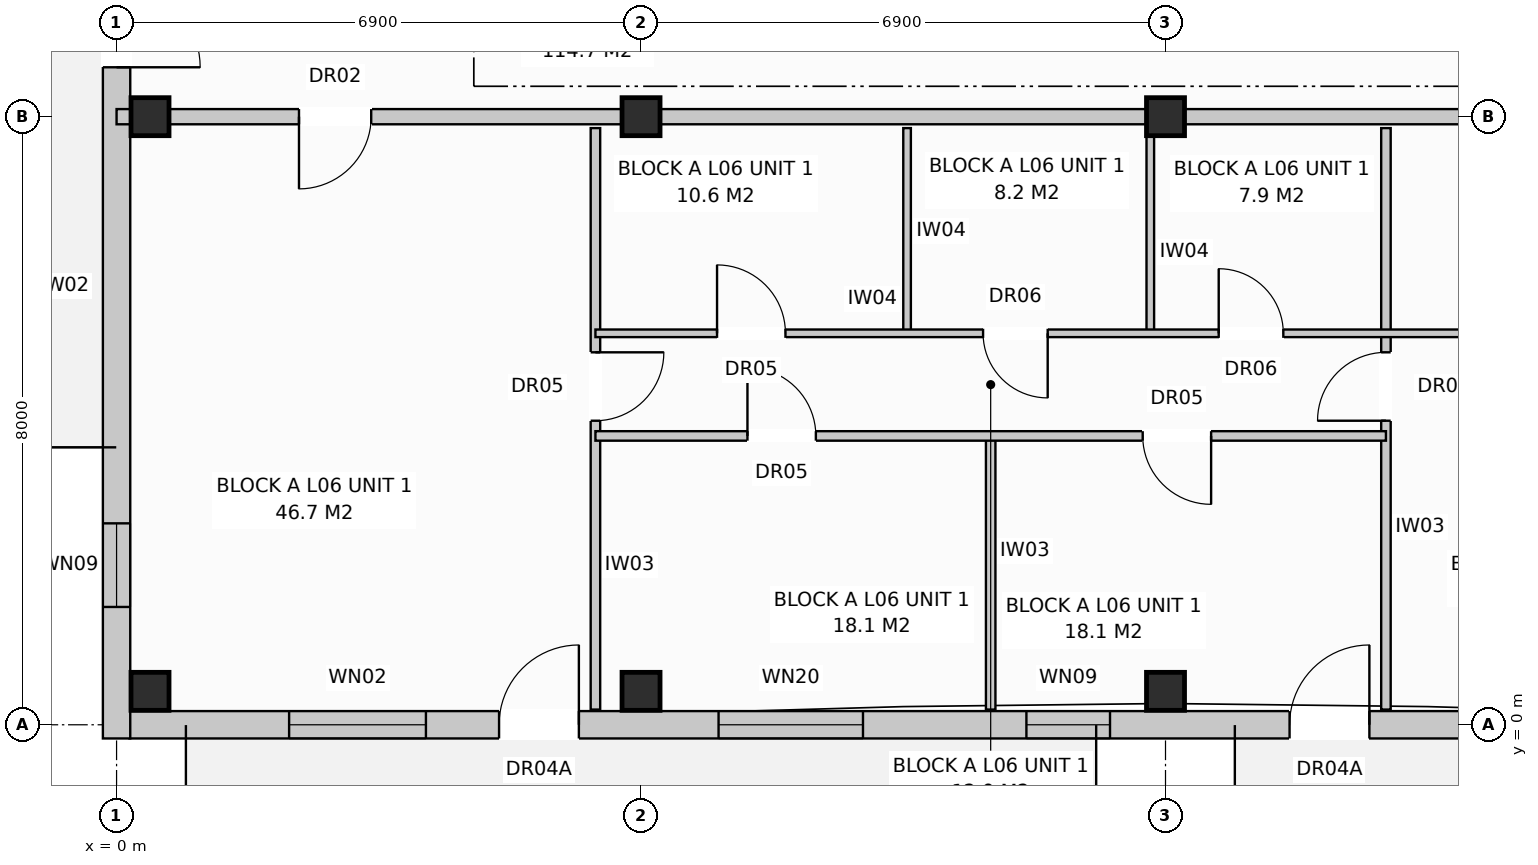
"""IFC4 building model, lengths in metres.
Left out: names, types, materials, properties, quantities, classifications, styles, units other than length and angle.
Written with IfcOpenShell. Run it as: python <this file> out.ifc"""

import sys

from ifc_helpers import new_model, si_unit, direction, frame, frame_2d, origin, origin_with_axes, origin_2d, place, context, subcontext, project, spatial, rectangle, extrude, element, fill, save


model = new_model("IFC4")
c1 = context("Model", 3, precision=1e-05, world=origin(), true_north=direction((0.0, 1.0)))
c2 = subcontext(c1, "Body", "Model", "MODEL_VIEW")
j1 = project(units=[si_unit("LENGTHUNIT", "METRE"), si_unit("PLANEANGLEUNIT", "RADIAN")], contexts=[c1])
p1 = place(None, origin())
s1 = spatial("IfcSite", under=j1, at=p1, CompositionType="ELEMENT")
p2 = place(p1, origin())
s2 = spatial("IfcBuilding", under=s1, at=p2, CompositionType="ELEMENT")
p3 = place(p2, frame((0.0, 0.0, 20.8)))
s3 = spatial("IfcBuildingStorey", under=s2, at=p3, CompositionType="ELEMENT", Elevation=20.8)
for number, where, z_axis, x_axis in (
    (1, (0.44, 0.44, 0.0), (0.0, 0.0, 1.0), (1.0, 0.0, 0.0)),
    (2, (0.44, 8.0, 0.0), (0.0, 0.0, 1.0), (1.0, 0.0, 0.0)),
    (3, (6.9, 0.44, 0.0), (0.0, 0.0, 1.0), (1.0, 0.0, 0.0)),
    (4, (6.9, 8.0, 0.0), (0.0, 0.0, 1.0), (1.0, 0.0, 0.0)),
    (5, (13.8, 0.44, 0.0), (0.0, 0.0, 1.0), (1.0, 0.0, 0.0)),
    (6, (13.8, 8.0, 0.0), (0.0, 0.0, 1.0), (1.0, 0.0, 0.0)),
):
    element("IfcColumn", number, at=place(p3, frame(where, z_axis=z_axis, x_axis=x_axis)), inside=s3, PredefinedType="COLUMN", context=c2, shape_type="SweptSolid", body=[
        extrude(rectangle(XDim=0.5, YDim=0.5, at=origin_2d()), origin(), (0.0, 0.0, 1.0), 3.2),
    ])
p4 = place(p3, frame((0.17, 0.0, 0.0), z_axis=(0.0, 0.0, 1.0), x_axis=(1.0, 0.0, 0.0)))
e7 = element("IfcWall", 7, at=p4, inside=s3, PredefinedType="STANDARD", context=c2, shape_type="SweptSolid", body=[
    extrude(rectangle(XDim=54.86, YDim=0.36, at=frame_2d((27.43, 0.0))), origin(), (0.0, 0.0, 1.0), 2.95),
])
p5 = place(p4, frame((4.862, 0.0, 0.0)))
e8 = element("IfcOpeningElement", 8, at=p5, cuts=e7, PredefinedType="OPENING", context=c2, shape_type="SweptSolid", body=[
    extrude(rectangle(XDim=1.05, YDim=2.12, at=frame_2d((0.525, 1.06))), frame((0.0, 0.192, 0.0), z_axis=(0.0, -1.0, 0.0), x_axis=(1.0, 0.0, 0.0)), (0.0, 0.0, 1.0), 0.384),
])
p6 = place(p4, frame((15.262, 0.0, 0.0)))
e9 = element("IfcOpeningElement", 9, at=p6, cuts=e7, PredefinedType="OPENING", context=c2, shape_type="SweptSolid", body=[
    extrude(rectangle(XDim=1.05, YDim=2.12, at=frame_2d((0.525, 1.06))), frame((0.0, 0.192, 0.0), z_axis=(0.0, -1.0, 0.0), x_axis=(1.0, 0.0, 0.0)), (0.0, 0.0, 1.0), 0.384),
])
p7 = place(p4, frame((31.362, 0.0, 0.0)))
e10 = element("IfcOpeningElement", 10, at=p7, cuts=e7, PredefinedType="OPENING", context=c2, shape_type="SweptSolid", body=[
    extrude(rectangle(XDim=1.05, YDim=2.12, at=frame_2d((0.525, 1.06))), frame((0.0, 0.192, 0.0), z_axis=(0.0, -1.0, 0.0), x_axis=(1.0, 0.0, 0.0)), (0.0, 0.0, 1.0), 0.384),
])
p8 = place(p4, frame((44.235, 0.0, 0.0)))
e11 = element("IfcOpeningElement", 11, at=p8, cuts=e7, PredefinedType="OPENING", context=c2, shape_type="SweptSolid", body=[
    extrude(rectangle(XDim=1.05, YDim=2.12, at=frame_2d((0.525, 1.06))), frame((0.0, 0.192, 0.0), z_axis=(0.0, -1.0, 0.0), x_axis=(1.0, 0.0, 0.0)), (0.0, 0.0, 1.0), 0.384),
])
p9 = place(p4, frame((2.1, 0.0, 0.8)))
e12 = element("IfcOpeningElement", 12, at=p9, cuts=e7, PredefinedType="OPENING", context=c2, shape_type="SweptSolid", body=[
    extrude(rectangle(XDim=1.8, YDim=1.7, at=frame_2d((0.9, 0.85))), frame((0.0, 0.192, 0.0), z_axis=(0.0, -1.0, 0.0), x_axis=(1.0, 0.0, 0.0)), (0.0, 0.0, 1.0), 0.384),
])
p10 = place(p4, frame((7.75, 0.0, 0.72)))
e13 = element("IfcOpeningElement", 13, at=p10, cuts=e7, PredefinedType="OPENING", context=c2, shape_type="SweptSolid", body=[
    extrude(rectangle(XDim=1.9, YDim=1.85, at=frame_2d((0.95, 0.925))), frame((0.0, 0.192, 0.0), z_axis=(0.0, -1.0, 0.0), x_axis=(1.0, 0.0, 0.0)), (0.0, 0.0, 1.0), 0.384),
])
p11 = place(p4, frame((11.8, 0.0, 0.72)))
e14 = element("IfcOpeningElement", 14, at=p11, cuts=e7, PredefinedType="OPENING", context=c2, shape_type="SweptSolid", body=[
    extrude(rectangle(XDim=1.1, YDim=1.5, at=frame_2d((0.55, 0.75))), frame((0.0, 0.192, 0.0), z_axis=(0.0, -1.0, 0.0), x_axis=(1.0, 0.0, 0.0)), (0.0, 0.0, 1.0), 0.384),
])
p12 = place(p4, frame((17.6, 0.0, 0.8)))
e15 = element("IfcOpeningElement", 15, at=p12, cuts=e7, PredefinedType="OPENING", context=c2, shape_type="SweptSolid", body=[
    extrude(rectangle(XDim=1.8, YDim=1.7, at=frame_2d((0.9, 0.85))), frame((0.0, 0.192, 0.0), z_axis=(0.0, -1.0, 0.0), x_axis=(1.0, 0.0, 0.0)), (0.0, 0.0, 1.0), 0.384),
])
p13 = place(p4, frame((21.55, 0.0, 0.72)))
e16 = element("IfcOpeningElement", 16, at=p13, cuts=e7, PredefinedType="OPENING", context=c2, shape_type="SweptSolid", body=[
    extrude(rectangle(XDim=1.9, YDim=1.85, at=frame_2d((0.95, 0.925))), frame((0.0, 0.192, 0.0), z_axis=(0.0, -1.0, 0.0), x_axis=(1.0, 0.0, 0.0)), (0.0, 0.0, 1.0), 0.384),
])
p14 = place(p4, frame((25.35, 0.0, 0.72)))
e17 = element("IfcOpeningElement", 17, at=p14, cuts=e7, PredefinedType="OPENING", context=c2, shape_type="SweptSolid", body=[
    extrude(rectangle(XDim=1.1, YDim=1.5, at=frame_2d((0.55, 0.75))), frame((0.0, 0.192, 0.0), z_axis=(0.0, -1.0, 0.0), x_axis=(1.0, 0.0, 0.0)), (0.0, 0.0, 1.0), 0.384),
])
p15 = place(p4, frame((29.2, 0.0, 0.8)))
e18 = element("IfcOpeningElement", 18, at=p15, cuts=e7, PredefinedType="OPENING", context=c2, shape_type="SweptSolid", body=[
    extrude(rectangle(XDim=1.8, YDim=1.7, at=frame_2d((0.9, 0.85))), frame((0.0, 0.192, 0.0), z_axis=(0.0, -1.0, 0.0), x_axis=(1.0, 0.0, 0.0)), (0.0, 0.0, 1.0), 0.384),
])
p16 = place(p4, frame((34.833, 0.0, 0.72)))
e19 = element("IfcOpeningElement", 19, at=p16, cuts=e7, PredefinedType="OPENING", context=c2, shape_type="SweptSolid", body=[
    extrude(rectangle(XDim=1.9, YDim=1.85, at=frame_2d((0.95, 0.925))), frame((0.0, 0.192, 0.0), z_axis=(0.0, -1.0, 0.0), x_axis=(1.0, 0.0, 0.0)), (0.0, 0.0, 1.0), 0.384),
])
p17 = place(p4, frame((38.025, 0.0, 0.8)))
e20 = element("IfcOpeningElement", 20, at=p17, cuts=e7, PredefinedType="OPENING", context=c2, shape_type="SweptSolid", body=[
    extrude(rectangle(XDim=1.95, YDim=1.65, at=frame_2d((0.975, 0.825))), frame((0.0, 0.192, 0.0), z_axis=(0.0, -1.0, 0.0), x_axis=(1.0, 0.0, 0.0)), (0.0, 0.0, 1.0), 0.384),
])
p18 = place(p4, frame((42.1, 0.0, 0.8)))
e21 = element("IfcOpeningElement", 21, at=p18, cuts=e7, PredefinedType="OPENING", context=c2, shape_type="SweptSolid", body=[
    extrude(rectangle(XDim=1.8, YDim=1.7, at=frame_2d((0.9, 0.85))), frame((0.0, 0.192, 0.0), z_axis=(0.0, -1.0, 0.0), x_axis=(1.0, 0.0, 0.0)), (0.0, 0.0, 1.0), 0.384),
])
p19 = place(p4, frame((45.75, 0.0, 0.72)))
e22 = element("IfcOpeningElement", 22, at=p19, cuts=e7, PredefinedType="OPENING", context=c2, shape_type="SweptSolid", body=[
    extrude(rectangle(XDim=1.9, YDim=1.85, at=frame_2d((0.95, 0.925))), frame((0.0, 0.192, 0.0), z_axis=(0.0, -1.0, 0.0), x_axis=(1.0, 0.0, 0.0)), (0.0, 0.0, 1.0), 0.384),
])
p20 = place(p4, frame((49.125, 0.0, 0.8)))
e23 = element("IfcOpeningElement", 23, at=p20, cuts=e7, PredefinedType="OPENING", context=c2, shape_type="SweptSolid", body=[
    extrude(rectangle(XDim=1.95, YDim=1.65, at=frame_2d((0.975, 0.825))), frame((0.0, 0.192, 0.0), z_axis=(0.0, -1.0, 0.0), x_axis=(1.0, 0.0, 0.0)), (0.0, 0.0, 1.0), 0.384),
])
p21 = place(p4, frame((52.415, 0.0, 0.8)))
e24 = element("IfcOpeningElement", 24, at=p21, cuts=e7, PredefinedType="OPENING", context=c2, shape_type="SweptSolid", body=[
    extrude(rectangle(XDim=1.8, YDim=1.7, at=frame_2d((0.9, 0.85))), frame((0.0, 0.192, 0.0), z_axis=(0.0, -1.0, 0.0), x_axis=(1.0, 0.0, 0.0)), (0.0, 0.0, 1.0), 0.384),
])
p22 = place(p3, frame((0.0, -0.18, 0.0), z_axis=(0.0, 0.0, 1.0), x_axis=(0.0, 1.0, 0.0)))
e25 = element("IfcWall", 25, at=p22, inside=s3, PredefinedType="STANDARD", context=c2, shape_type="SweptSolid", body=[
    extrude(rectangle(XDim=18.76, YDim=0.36, at=frame_2d((9.38, 0.0))), origin(), (0.0, 0.0, 1.0), 2.95),
])
p23 = place(p22, frame((8.83, 0.0, 0.0)))
e26 = element("IfcOpeningElement", 26, at=p23, cuts=e25, PredefinedType="OPENING", context=c2, shape_type="SweptSolid", body=[
    extrude(rectangle(XDim=1.1, YDim=2.1, at=frame_2d((0.55, 1.05))), frame((0.0, 0.192, 0.0), z_axis=(0.0, -1.0, 0.0), x_axis=(1.0, 0.0, 0.0)), (0.0, 0.0, 1.0), 0.384),
])
p24 = place(p22, frame((1.73, 0.0, 0.72)))
e27 = element("IfcOpeningElement", 27, at=p24, cuts=e25, PredefinedType="OPENING", context=c2, shape_type="SweptSolid", body=[
    extrude(rectangle(XDim=1.1, YDim=1.5, at=frame_2d((0.55, 0.75))), frame((0.0, 0.192, 0.0), z_axis=(0.0, -1.0, 0.0), x_axis=(1.0, 0.0, 0.0)), (0.0, 0.0, 1.0), 0.384),
])
p25 = place(p22, frame((15.93, 0.0, 0.72)))
e28 = element("IfcOpeningElement", 28, at=p25, cuts=e25, PredefinedType="OPENING", context=c2, shape_type="SweptSolid", body=[
    extrude(rectangle(XDim=1.1, YDim=1.5, at=frame_2d((0.55, 0.75))), frame((0.0, 0.192, 0.0), z_axis=(0.0, -1.0, 0.0), x_axis=(1.0, 0.0, 0.0)), (0.0, 0.0, 1.0), 0.384),
])
p26 = place(p3, frame((0.0, 8.0, 0.0), z_axis=(0.0, 0.0, 1.0), x_axis=(1.0, 0.0, 0.0)))
e29 = element("IfcWall", 29, at=p26, inside=s3, PredefinedType="PARTITIONING", context=c2, shape_type="SweptSolid", body=[
    extrude(rectangle(XDim=20.7, YDim=0.2, at=frame_2d((10.35, 0.0))), origin(), (0.0, 0.0, 1.0), 2.39),
])
p27 = place(p26, frame((2.4, 0.0, 0.0)))
e30 = element("IfcOpeningElement", 30, at=p27, cuts=e29, PredefinedType="OPENING", context=c2, shape_type="SweptSolid", body=[
    extrude(rectangle(XDim=0.95, YDim=2.15, at=frame_2d((0.475, 1.075))), frame((0.0, 0.112, 0.0), z_axis=(0.0, -1.0, 0.0), x_axis=(1.0, 0.0, 0.0)), (0.0, 0.0, 1.0), 0.224),
])
p28 = place(p3, frame((6.3, 7.85, 0.0), z_axis=(0.0, 0.0, 1.0), x_axis=(0.0, -1.0, 0.0)))
e31 = element("IfcWall", 31, at=p28, inside=s3, PredefinedType="PARTITIONING", context=c2, shape_type="SweptSolid", body=[
    extrude(rectangle(XDim=7.65, YDim=0.125, at=frame_2d((3.825, 0.0))), origin(), (0.0, 0.0, 1.0), 2.95),
])
p29 = place(p28, frame((2.95, 0.0, 0.0)))
e32 = element("IfcOpeningElement", 32, at=p29, cuts=e31, PredefinedType="OPENING", context=c2, shape_type="SweptSolid", body=[
    extrude(rectangle(XDim=0.9, YDim=2.1, at=frame_2d((0.45, 1.05))), frame((0.0, 0.074, 0.0), z_axis=(0.0, -1.0, 0.0), x_axis=(1.0, 0.0, 0.0)), (0.0, 0.0, 1.0), 0.149),
])
for number, where, z_axis, x_axis in (
    (33, (10.4, 7.85, 0.0), (0.0, 0.0, 1.0), (0.0, -1.0, 0.0)),
    (34, (13.6, 7.85, 0.0), (0.0, 0.0, 1.0), (0.0, -1.0, 0.0)),
):
    element("IfcWall", number, at=place(p3, frame(where, z_axis=z_axis, x_axis=x_axis)), inside=s3, PredefinedType="PARTITIONING", context=c2, shape_type="SweptSolid", body=[
        extrude(rectangle(XDim=2.7, YDim=0.1, at=frame_2d((1.35, 0.0))), origin(), (0.0, 0.0, 1.0), 2.95),
    ])
p30 = place(p3, frame((11.5, 3.8, 0.0), z_axis=(0.0, 0.0, 1.0), x_axis=(0.0, -1.0, 0.0)))
e35 = element("IfcWall", 35, at=p30, inside=s3, PredefinedType="PARTITIONING", context=c2, shape_type="SweptSolid", body=[
    extrude(rectangle(XDim=3.6, YDim=0.125, at=frame_2d((1.8, 0.0))), origin(), (0.0, 0.0, 1.0), 2.95),
])
p31 = place(p3, frame((16.7, 7.85, 0.0), z_axis=(0.0, 0.0, 1.0), x_axis=(0.0, -1.0, 0.0)))
e36 = element("IfcWall", 36, at=p31, inside=s3, PredefinedType="PARTITIONING", context=c2, shape_type="SweptSolid", body=[
    extrude(rectangle(XDim=7.65, YDim=0.125, at=frame_2d((3.825, 0.0))), origin(), (0.0, 0.0, 1.0), 2.95),
])
p32 = place(p31, frame((2.95, 0.0, 0.0)))
e37 = element("IfcOpeningElement", 37, at=p32, cuts=e36, PredefinedType="OPENING", context=c2, shape_type="SweptSolid", body=[
    extrude(rectangle(XDim=0.9, YDim=2.1, at=frame_2d((0.45, 1.05))), frame((0.0, 0.074, 0.0), z_axis=(0.0, -1.0, 0.0), x_axis=(1.0, 0.0, 0.0)), (0.0, 0.0, 1.0), 0.149),
])
p33 = place(p3, frame((6.3, 5.15, 0.0), z_axis=(0.0, 0.0, 1.0), x_axis=(1.0, 0.0, 0.0)))
e38 = element("IfcWall", 38, at=p33, inside=s3, PredefinedType="PARTITIONING", context=c2, shape_type="SweptSolid", body=[
    extrude(rectangle(XDim=14.3, YDim=0.1, at=frame_2d((7.15, 0.0))), origin(), (0.0, 0.0, 1.0), 2.95),
])
p34 = place(p33, frame((1.6, 0.0, 0.0)))
e39 = element("IfcOpeningElement", 39, at=p34, cuts=e38, PredefinedType="OPENING", context=c2, shape_type="SweptSolid", body=[
    extrude(rectangle(XDim=0.9, YDim=2.1, at=frame_2d((0.45, 1.05))), frame((0.0, 0.062, 0.0), z_axis=(0.0, -1.0, 0.0), x_axis=(1.0, 0.0, 0.0)), (0.0, 0.0, 1.0), 0.124),
])
p35 = place(p33, frame((5.1, 0.0, 0.0)))
e40 = element("IfcOpeningElement", 40, at=p35, cuts=e38, PredefinedType="OPENING", context=c2, shape_type="SweptSolid", body=[
    extrude(rectangle(XDim=0.85, YDim=2.05, at=frame_2d((0.425, 1.025))), frame((0.0, 0.062, 0.0), z_axis=(0.0, -1.0, 0.0), x_axis=(1.0, 0.0, 0.0)), (0.0, 0.0, 1.0), 0.124),
])
p36 = place(p33, frame((8.2, 0.0, 0.0)))
e41 = element("IfcOpeningElement", 41, at=p36, cuts=e38, PredefinedType="OPENING", context=c2, shape_type="SweptSolid", body=[
    extrude(rectangle(XDim=0.85, YDim=2.05, at=frame_2d((0.425, 1.025))), frame((0.0, 0.062, 0.0), z_axis=(0.0, -1.0, 0.0), x_axis=(1.0, 0.0, 0.0)), (0.0, 0.0, 1.0), 0.124),
])
p37 = place(p33, frame((11.6, 0.0, 0.0)))
e42 = element("IfcOpeningElement", 42, at=p37, cuts=e38, PredefinedType="OPENING", context=c2, shape_type="SweptSolid", body=[
    extrude(rectangle(XDim=0.85, YDim=2.05, at=frame_2d((0.425, 1.025))), frame((0.0, 0.062, 0.0), z_axis=(0.0, -1.0, 0.0), x_axis=(1.0, 0.0, 0.0)), (0.0, 0.0, 1.0), 0.124),
])
p38 = place(p3, frame((6.3, 3.8, 0.0), z_axis=(0.0, 0.0, 1.0), x_axis=(1.0, 0.0, 0.0)))
e43 = element("IfcWall", 43, at=p38, inside=s3, PredefinedType="PARTITIONING", context=c2, shape_type="SweptSolid", body=[
    extrude(rectangle(XDim=10.4, YDim=0.125, at=frame_2d((5.2, 0.0))), origin(), (0.0, 0.0, 1.0), 2.95),
])
p39 = place(p38, frame((2.0, 0.0, 0.0)))
e44 = element("IfcOpeningElement", 44, at=p39, cuts=e43, PredefinedType="OPENING", context=c2, shape_type="SweptSolid", body=[
    extrude(rectangle(XDim=0.9, YDim=2.1, at=frame_2d((0.45, 1.05))), frame((0.0, 0.074, 0.0), z_axis=(0.0, -1.0, 0.0), x_axis=(1.0, 0.0, 0.0)), (0.0, 0.0, 1.0), 0.149),
])
p40 = place(p38, frame((7.2, 0.0, 0.0)))
e45 = element("IfcOpeningElement", 45, at=p40, cuts=e43, PredefinedType="OPENING", context=c2, shape_type="SweptSolid", body=[
    extrude(rectangle(XDim=0.9, YDim=2.1, at=frame_2d((0.45, 1.05))), frame((0.0, 0.074, 0.0), z_axis=(0.0, -1.0, 0.0), x_axis=(1.0, 0.0, 0.0)), (0.0, 0.0, 1.0), 0.149),
])
p41 = place(p5, origin_with_axes())
e46 = element("IfcDoor", 46, at=p41, inside=s3, OperationType="SINGLE_SWING_RIGHT", PredefinedType="DOOR", context=c2, shape_type="SweptSolid", body=[
    extrude(rectangle(XDim=1.05, YDim=2.12, at=frame_2d((0.525, 1.06))), frame((0.0, 0.025, 0.0), z_axis=(0.0, -1.0, 0.0), x_axis=(1.0, 0.0, 0.0)), (0.0, 0.0, 1.0), 0.05),
])
fill(e8, e46)
p42 = place(p6, origin_with_axes())
e47 = element("IfcDoor", 47, at=p42, inside=s3, OperationType="SINGLE_SWING_RIGHT", PredefinedType="DOOR", context=c2, shape_type="SweptSolid", body=[
    extrude(rectangle(XDim=1.05, YDim=2.12, at=frame_2d((0.525, 1.06))), frame((0.0, 0.025, 0.0), z_axis=(0.0, -1.0, 0.0), x_axis=(1.0, 0.0, 0.0)), (0.0, 0.0, 1.0), 0.05),
])
fill(e9, e47)
p43 = place(p9, origin_with_axes())
e48 = element("IfcWindow", 48, at=p43, inside=s3, PartitioningType="SINGLE_PANEL", PredefinedType="WINDOW", context=c2, shape_type="SweptSolid", body=[
    extrude(rectangle(XDim=1.8, YDim=1.7, at=frame_2d((0.9, 0.85))), frame((0.0, 0.03, 0.0), z_axis=(0.0, -1.0, 0.0), x_axis=(1.0, 0.0, 0.0)), (0.0, 0.0, 1.0), 0.06),
])
fill(e12, e48)
p44 = place(p10, origin_with_axes())
e49 = element("IfcWindow", 49, at=p44, inside=s3, PartitioningType="SINGLE_PANEL", PredefinedType="WINDOW", context=c2, shape_type="SweptSolid", body=[
    extrude(rectangle(XDim=1.9, YDim=1.85, at=frame_2d((0.95, 0.925))), frame((0.0, 0.03, 0.0), z_axis=(0.0, -1.0, 0.0), x_axis=(1.0, 0.0, 0.0)), (0.0, 0.0, 1.0), 0.06),
])
fill(e13, e49)
p45 = place(p11, origin_with_axes())
e50 = element("IfcWindow", 50, at=p45, inside=s3, PartitioningType="SINGLE_PANEL", PredefinedType="WINDOW", context=c2, shape_type="SweptSolid", body=[
    extrude(rectangle(XDim=1.1, YDim=1.5, at=frame_2d((0.55, 0.75))), frame((0.0, 0.03, 0.0), z_axis=(0.0, -1.0, 0.0), x_axis=(1.0, 0.0, 0.0)), (0.0, 0.0, 1.0), 0.06),
])
fill(e14, e50)
p46 = place(p23, frame((1.1, 0.0, 0.0), z_axis=(0.0, 0.0, 1.0), x_axis=(-1.0, 0.0, 0.0)))
e51 = element("IfcDoor", 51, at=p46, inside=s3, OperationType="SINGLE_SWING_LEFT", PredefinedType="DOOR", context=c2, shape_type="SweptSolid", body=[
    extrude(rectangle(XDim=1.1, YDim=2.1, at=frame_2d((0.55, 1.05))), frame((0.0, 0.025, 0.0), z_axis=(0.0, -1.0, 0.0), x_axis=(1.0, 0.0, 0.0)), (0.0, 0.0, 1.0), 0.05),
])
fill(e26, e51)
p47 = place(p24, origin_with_axes())
e52 = element("IfcWindow", 52, at=p47, inside=s3, PartitioningType="SINGLE_PANEL", PredefinedType="WINDOW", context=c2, shape_type="SweptSolid", body=[
    extrude(rectangle(XDim=1.1, YDim=1.5, at=frame_2d((0.55, 0.75))), frame((0.0, 0.03, 0.0), z_axis=(0.0, -1.0, 0.0), x_axis=(1.0, 0.0, 0.0)), (0.0, 0.0, 1.0), 0.06),
])
fill(e27, e52)
p48 = place(p27, frame((0.95, 0.0, 0.0), z_axis=(0.0, 0.0, 1.0), x_axis=(-1.0, 0.0, 0.0)))
e53 = element("IfcDoor", 53, at=p48, inside=s3, OperationType="SINGLE_SWING_LEFT", PredefinedType="DOOR", context=c2, shape_type="SweptSolid", body=[
    extrude(rectangle(XDim=0.95, YDim=2.15, at=frame_2d((0.475, 1.075))), frame((0.0, 0.025, 0.0), z_axis=(0.0, -1.0, 0.0), x_axis=(1.0, 0.0, 0.0)), (0.0, 0.0, 1.0), 0.05),
])
fill(e30, e53)
p49 = place(p29, origin_with_axes())
e54 = element("IfcDoor", 54, at=p49, inside=s3, OperationType="SINGLE_SWING_LEFT", PredefinedType="DOOR", context=c2, shape_type="SweptSolid", body=[
    extrude(rectangle(XDim=0.9, YDim=2.1, at=frame_2d((0.45, 1.05))), frame((0.0, 0.025, 0.0), z_axis=(0.0, -1.0, 0.0), x_axis=(1.0, 0.0, 0.0)), (0.0, 0.0, 1.0), 0.05),
])
fill(e32, e54)
p50 = place(p32, frame((0.9, 0.0, 0.0), z_axis=(0.0, 0.0, 1.0), x_axis=(-1.0, 0.0, 0.0)))
e55 = element("IfcDoor", 55, at=p50, inside=s3, OperationType="SINGLE_SWING_RIGHT", PredefinedType="DOOR", context=c2, shape_type="SweptSolid", body=[
    extrude(rectangle(XDim=0.9, YDim=2.1, at=frame_2d((0.45, 1.05))), frame((0.0, 0.025, 0.0), z_axis=(0.0, -1.0, 0.0), x_axis=(1.0, 0.0, 0.0)), (0.0, 0.0, 1.0), 0.05),
])
fill(e37, e55)
p51 = place(p34, origin_with_axes())
e56 = element("IfcDoor", 56, at=p51, inside=s3, OperationType="SINGLE_SWING_LEFT", PredefinedType="DOOR", context=c2, shape_type="SweptSolid", body=[
    extrude(rectangle(XDim=0.9, YDim=2.1, at=frame_2d((0.45, 1.05))), frame((0.0, 0.025, 0.0), z_axis=(0.0, -1.0, 0.0), x_axis=(1.0, 0.0, 0.0)), (0.0, 0.0, 1.0), 0.05),
])
fill(e39, e56)
p52 = place(p35, frame((0.85, 0.0, 0.0), z_axis=(0.0, 0.0, 1.0), x_axis=(-1.0, 0.0, 0.0)))
e57 = element("IfcDoor", 57, at=p52, inside=s3, OperationType="SINGLE_SWING_RIGHT", PredefinedType="DOOR", context=c2, shape_type="SweptSolid", body=[
    extrude(rectangle(XDim=0.85, YDim=2.05, at=frame_2d((0.425, 1.025))), frame((0.0, 0.025, 0.0), z_axis=(0.0, -1.0, 0.0), x_axis=(1.0, 0.0, 0.0)), (0.0, 0.0, 1.0), 0.05),
])
fill(e40, e57)
p53 = place(p36, origin_with_axes())
e58 = element("IfcDoor", 58, at=p53, inside=s3, OperationType="SINGLE_SWING_LEFT", PredefinedType="DOOR", context=c2, shape_type="SweptSolid", body=[
    extrude(rectangle(XDim=0.85, YDim=2.05, at=frame_2d((0.425, 1.025))), frame((0.0, 0.025, 0.0), z_axis=(0.0, -1.0, 0.0), x_axis=(1.0, 0.0, 0.0)), (0.0, 0.0, 1.0), 0.05),
])
fill(e41, e58)
p54 = place(p39, origin_with_axes())
e59 = element("IfcDoor", 59, at=p54, inside=s3, OperationType="SINGLE_SWING_LEFT", PredefinedType="DOOR", context=c2, shape_type="SweptSolid", body=[
    extrude(rectangle(XDim=0.9, YDim=2.1, at=frame_2d((0.45, 1.05))), frame((0.0, 0.025, 0.0), z_axis=(0.0, -1.0, 0.0), x_axis=(1.0, 0.0, 0.0)), (0.0, 0.0, 1.0), 0.05),
])
fill(e44, e59)
p55 = place(p40, frame((0.9, 0.0, 0.0), z_axis=(0.0, 0.0, 1.0), x_axis=(-1.0, 0.0, 0.0)))
e60 = element("IfcDoor", 60, at=p55, inside=s3, OperationType="SINGLE_SWING_RIGHT", PredefinedType="DOOR", context=c2, shape_type="SweptSolid", body=[
    extrude(rectangle(XDim=0.9, YDim=2.1, at=frame_2d((0.45, 1.05))), frame((0.0, 0.025, 0.0), z_axis=(0.0, -1.0, 0.0), x_axis=(1.0, 0.0, 0.0)), (0.0, 0.0, 1.0), 0.05),
])
fill(e45, e60)
save(model, sys.argv[1])
